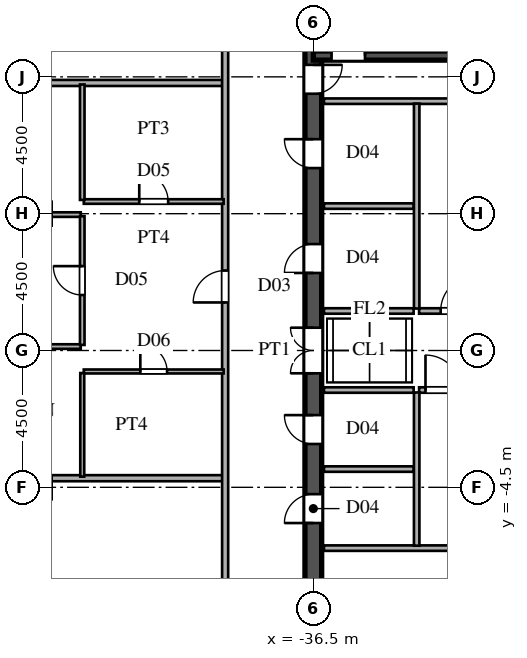
"""IFC4 building model, lengths in metres.
Left out: names, types, materials, properties, quantities, classifications, styles, units other than length and angle.
Written with IfcOpenShell. Run it as: python <this file> out.ifc"""

import sys

from ifc_helpers import new_model, si_unit, direction, frame, frame_2d, origin, place, context, subcontext, project, spatial, rectangle, extrude, source, transform, mapped, element, fill, save


model = new_model("IFC4")
c1 = context("Model", 3, precision=1e-05, world=origin(), true_north=direction((0.0, 1.0)))
c2 = subcontext(c1, "Body", "Model", "MODEL_VIEW")
j1 = project(units=[si_unit("LENGTHUNIT", "METRE"), si_unit("PLANEANGLEUNIT", "RADIAN")], contexts=[c1])
p1 = place(None, origin())
s1 = spatial("IfcSite", under=j1, at=p1, CompositionType="ELEMENT")
p2 = place(p1, origin())
s2 = spatial("IfcBuilding", under=s1, at=p2, CompositionType="ELEMENT")
p3 = place(p2, frame((0.0, 0.0, 151.2)))
s3 = spatial("IfcBuildingStorey", under=s2, at=p3, CompositionType="ELEMENT", Elevation=151.2)
p4 = place(p3, frame((-36.5, -13.65, 0.0), z_axis=(0.0, 0.0, 1.0), x_axis=(0.0, 1.0, 0.0)))
e1 = element("IfcWall", 1, at=p4, inside=s3, PredefinedType="SHEAR", context=c2, shape_type="SweptSolid", body=[
    extrude(rectangle(XDim=7.15, YDim=0.55, at=frame_2d((3.575, 0.0))), origin(), (0.0, 0.0, 1.0), 3.38),
])
p5 = place(p4, frame((4.675, 0.0, 0.0)))
e2 = element("IfcOpeningElement", 2, at=p5, cuts=e1, PredefinedType="OPENING", context=c2, shape_type="SweptSolid", body=[
    extrude(rectangle(XDim=1.15, YDim=2.2, at=frame_2d((0.575, 1.1))), frame((0.0, 0.285, 0.0), z_axis=(0.0, -1.0, 0.0), x_axis=(1.0, 0.0, 0.0)), (0.0, 0.0, 1.0), 0.57),
])
p6 = place(p3, frame((-36.5, -1.3, 0.0), z_axis=(0.0, 0.0, 1.0), x_axis=(0.0, 1.0, 0.0)))
e3 = element("IfcWall", 3, at=p6, inside=s3, PredefinedType="SHEAR", context=c2, shape_type="SweptSolid", body=[
    extrude(rectangle(XDim=2.6, YDim=0.55, at=frame_2d((1.3, 0.0))), origin(), (0.0, 0.0, 1.0), 3.38),
])
p7 = place(p6, frame((0.55, 0.0, 0.0)))
e4 = element("IfcOpeningElement", 4, at=p7, cuts=e3, PredefinedType="OPENING", context=c2, shape_type="SweptSolid", body=[
    extrude(rectangle(XDim=1.5, YDim=2.3, at=frame_2d((0.75, 1.15))), frame((0.0, 0.285, 0.0), z_axis=(0.0, -1.0, 0.0), x_axis=(1.0, 0.0, 0.0)), (0.0, 0.0, 1.0), 0.57),
])
p8 = place(p3, frame((-36.5, 8.2, 0.0), z_axis=(0.0, 0.0, 1.0), x_axis=(0.0, 1.0, 0.0)))
e5 = element("IfcWall", 5, at=p8, inside=s3, PredefinedType="SHEAR", context=c2, shape_type="SweptSolid", body=[
    extrude(rectangle(XDim=5.45, YDim=0.55, at=frame_2d((2.725, 0.0))), origin(), (0.0, 0.0, 1.0), 3.38),
])
p9 = place(p8, frame((0.245, 0.0, 0.0)))
e6 = element("IfcOpeningElement", 6, at=p9, cuts=e5, PredefinedType="OPENING", context=c2, shape_type="SweptSolid", body=[
    extrude(rectangle(XDim=0.95, YDim=2.15, at=frame_2d((0.475, 1.075))), frame((0.0, 0.285, 0.0), z_axis=(0.0, -1.0, 0.0), x_axis=(1.0, 0.0, 0.0)), (0.0, 0.0, 1.0), 0.57),
])
p10 = place(p3, frame((-36.5, -6.5, 0.0), z_axis=(0.0, 0.0, 1.0), x_axis=(0.0, 1.0, 0.0)))
e7 = element("IfcWall", 7, at=p10, inside=s3, PredefinedType="SHEAR", context=c2, shape_type="SweptSolid", body=[
    extrude(rectangle(XDim=2.6, YDim=0.55, at=frame_2d((1.3, 0.0))), origin(), (0.0, 0.0, 1.0), 3.38),
])
p11 = place(p10, frame((0.825, 0.0, 0.0)))
e8 = element("IfcOpeningElement", 8, at=p11, cuts=e7, PredefinedType="OPENING", context=c2, shape_type="SweptSolid", body=[
    extrude(rectangle(XDim=0.95, YDim=2.15, at=frame_2d((0.475, 1.075))), frame((0.0, 0.285, 0.0), z_axis=(0.0, -1.0, 0.0), x_axis=(1.0, 0.0, 0.0)), (0.0, 0.0, 1.0), 0.57),
])
p12 = place(p3, frame((-36.5, -3.9, 0.0), z_axis=(0.0, 0.0, 1.0), x_axis=(0.0, 1.0, 0.0)))
e9 = element("IfcWall", 9, at=p12, inside=s3, PredefinedType="SHEAR", context=c2, shape_type="SweptSolid", body=[
    extrude(rectangle(XDim=2.6, YDim=0.55, at=frame_2d((1.3, 0.0))), origin(), (0.0, 0.0, 1.0), 3.38),
])
p13 = place(p12, frame((0.825, 0.0, 0.0)))
e10 = element("IfcOpeningElement", 10, at=p13, cuts=e9, PredefinedType="OPENING", context=c2, shape_type="SweptSolid", body=[
    extrude(rectangle(XDim=0.95, YDim=2.15, at=frame_2d((0.475, 1.075))), frame((0.0, 0.285, 0.0), z_axis=(0.0, -1.0, 0.0), x_axis=(1.0, 0.0, 0.0)), (0.0, 0.0, 1.0), 0.57),
])
p14 = place(p3, frame((-36.5, 1.3, 0.0), z_axis=(0.0, 0.0, 1.0), x_axis=(0.0, 1.0, 0.0)))
e11 = element("IfcWall", 11, at=p14, inside=s3, PredefinedType="SHEAR", context=c2, shape_type="SweptSolid", body=[
    extrude(rectangle(XDim=3.45, YDim=0.55, at=frame_2d((1.725, 0.0))), origin(), (0.0, 0.0, 1.0), 3.38),
])
p15 = place(p14, frame((1.25, 0.0, 0.0)))
e12 = element("IfcOpeningElement", 12, at=p15, cuts=e11, PredefinedType="OPENING", context=c2, shape_type="SweptSolid", body=[
    extrude(rectangle(XDim=0.95, YDim=2.15, at=frame_2d((0.475, 1.075))), frame((0.0, 0.285, 0.0), z_axis=(0.0, -1.0, 0.0), x_axis=(1.0, 0.0, 0.0)), (0.0, 0.0, 1.0), 0.57),
])
p16 = place(p3, frame((-36.5, 4.75, 0.0), z_axis=(0.0, 0.0, 1.0), x_axis=(0.0, 1.0, 0.0)))
e13 = element("IfcWall", 13, at=p16, inside=s3, PredefinedType="SHEAR", context=c2, shape_type="SweptSolid", body=[
    extrude(rectangle(XDim=3.45, YDim=0.55, at=frame_2d((1.725, 0.0))), origin(), (0.0, 0.0, 1.0), 3.38),
])
p17 = place(p16, frame((1.25, 0.0, 0.0)))
e14 = element("IfcOpeningElement", 14, at=p17, cuts=e13, PredefinedType="OPENING", context=c2, shape_type="SweptSolid", body=[
    extrude(rectangle(XDim=0.95, YDim=2.15, at=frame_2d((0.475, 1.075))), frame((0.0, 0.285, 0.0), z_axis=(0.0, -1.0, 0.0), x_axis=(1.0, 0.0, 0.0)), (0.0, 0.0, 1.0), 0.57),
])
p18 = place(p3, frame((-36.5, 9.7, 0.0), z_axis=(0.0, 0.0, 1.0), x_axis=(1.0, 0.0, 0.0)))
e15 = element("IfcWall", 15, at=p18, inside=s3, PredefinedType="SHEAR", context=c2, shape_type="SweptSolid", body=[
    extrude(rectangle(XDim=9.0, YDim=0.3, at=frame_2d((4.5, 0.0))), origin(), (0.0, 0.0, 1.0), 3.38),
])
p19 = place(p18, frame((0.6, 0.0, 0.0)))
e16 = element("IfcOpeningElement", 16, at=p19, cuts=e15, PredefinedType="OPENING", context=c2, shape_type="SweptSolid", body=[
    extrude(rectangle(XDim=1.1, YDim=2.2, at=frame_2d((0.55, 1.1))), frame((0.0, 0.16, 0.0), z_axis=(0.0, -1.0, 0.0), x_axis=(1.0, 0.0, 0.0)), (0.0, 0.0, 1.0), 0.32),
])
for number, where, z_axis, x_axis in (
    (17, (-36.15, -6.5, 0.0), (0.0, 0.0, 1.0), (1.0, 0.0, 0.0)),
    (18, (-36.15, 8.2, 0.0), (0.0, 0.0, 1.0), (1.0, 0.0, 0.0)),
):
    element("IfcWall", number, at=place(p3, frame(where, z_axis=z_axis, x_axis=x_axis)), inside=s3, PredefinedType="PARTITIONING", context=c2, shape_type="SweptSolid", body=[
        extrude(rectangle(XDim=5.7, YDim=0.18, at=frame_2d((2.85, 0.0))), origin(), (0.0, 0.0, 1.0), 3.38),
    ])
p20 = place(p3, frame((-33.1, -6.42, 0.0), z_axis=(0.0, 0.0, 1.0), x_axis=(0.0, 1.0, 0.0)))
e19 = element("IfcWall", 19, at=p20, inside=s3, PredefinedType="PARTITIONING", context=c2, shape_type="SweptSolid", body=[
    extrude(rectangle(XDim=5.04, YDim=0.18, at=frame_2d((2.52, 0.0))), origin(), (0.0, 0.0, 1.0), 3.38),
])
p21 = place(p3, frame((-33.1, 1.38, 0.0), z_axis=(0.0, 0.0, 1.0), x_axis=(0.0, 1.0, 0.0)))
e20 = element("IfcWall", 20, at=p21, inside=s3, PredefinedType="PARTITIONING", context=c2, shape_type="SweptSolid", body=[
    extrude(rectangle(XDim=6.74, YDim=0.18, at=frame_2d((3.37, 0.0))), origin(), (0.0, 0.0, 1.0), 3.38),
])
p22 = place(p3, frame((-33.02, -1.3, 0.0), z_axis=(0.0, 0.0, 1.0), x_axis=(1.0, 0.0, 0.0)))
e21 = element("IfcWall", 21, at=p22, inside=s3, PredefinedType="PARTITIONING", context=c2, shape_type="SweptSolid", body=[
    extrude(rectangle(XDim=2.72, YDim=0.18, at=frame_2d((1.36, 0.0))), origin(), (0.0, 0.0, 1.0), 3.38),
])
p23 = place(p22, frame((0.21, 0.0, 0.0)))
e22 = element("IfcOpeningElement", 22, at=p23, cuts=e21, PredefinedType="OPENING", context=c2, shape_type="SweptSolid", body=[
    extrude(rectangle(XDim=1.15, YDim=2.2, at=frame_2d((0.575, 1.1))), frame((0.0, 0.1, 0.0), z_axis=(0.0, -1.0, 0.0), x_axis=(1.0, 0.0, 0.0)), (0.0, 0.0, 1.0), 0.2),
])
p24 = place(p3, frame((-33.02, 1.3, 0.0), z_axis=(0.0, 0.0, 1.0), x_axis=(1.0, 0.0, 0.0)))
e23 = element("IfcWall", 23, at=p24, inside=s3, PredefinedType="PARTITIONING", context=c2, shape_type="SweptSolid", body=[
    extrude(rectangle(XDim=2.57, YDim=0.18, at=frame_2d((1.285, 0.0))), origin(), (0.0, 0.0, 1.0), 3.38),
])
p25 = place(p24, frame((0.71, 0.0, 0.0)))
e24 = element("IfcOpeningElement", 24, at=p25, cuts=e23, PredefinedType="OPENING", context=c2, shape_type="SweptSolid", body=[
    extrude(rectangle(XDim=1.15, YDim=2.2, at=frame_2d((0.575, 1.1))), frame((0.0, 0.1, 0.0), z_axis=(0.0, -1.0, 0.0), x_axis=(1.0, 0.0, 0.0)), (0.0, 0.0, 1.0), 0.2),
])
for number, where, z_axis, x_axis in (
    (25, (-36.15, -1.3, 0.0), (0.0, 0.0, 1.0), (1.0, 0.0, 0.0)),
    (26, (-36.15, 1.3, 0.0), (0.0, 0.0, 1.0), (1.0, 0.0, 0.0)),
    (27, (-36.15, -3.9, 0.0), (0.0, 0.0, 1.0), (1.0, 0.0, 0.0)),
    (28, (-36.15, 4.75, 0.0), (0.0, 0.0, 1.0), (1.0, 0.0, 0.0)),
):
    element("IfcWall", number, at=place(p3, frame(where, z_axis=z_axis, x_axis=x_axis)), inside=s3, PredefinedType="PARTITIONING", context=c2, shape_type="SweptSolid", body=[
        extrude(rectangle(XDim=2.95, YDim=0.18, at=frame_2d((1.475, 0.0))), origin(), (0.0, 0.0, 1.0), 3.38),
    ])
p26 = place(p3, frame((-69.375, -4.2, 0.0), z_axis=(0.0, 0.0, 1.0), x_axis=(1.0, 0.0, 0.0)))
e29 = element("IfcWall", 29, at=p26, inside=s3, PredefinedType="PARTITIONING", context=c2, shape_type="SweptSolid", body=[
    extrude(rectangle(XDim=29.895, YDim=0.2, at=frame_2d((14.948, 0.0))), origin(), (0.0, 0.0, 1.0), 3.38),
])
p27 = place(p3, frame((-44.05, -0.69, 0.0), z_axis=(0.0, 0.0, 1.0), x_axis=(1.0, 0.0, 0.0)))
e30 = element("IfcWall", 30, at=p27, inside=s3, PredefinedType="PARTITIONING", context=c2, shape_type="SweptSolid", body=[
    extrude(rectangle(XDim=4.6, YDim=0.13, at=frame_2d((2.3, 0.0))), origin(), (0.0, 0.0, 1.0), 3.38),
])
p28 = place(p27, frame((1.86, 0.0, 0.0)))
e31 = element("IfcOpeningElement", 31, at=p28, cuts=e30, PredefinedType="OPENING", context=c2, shape_type="SweptSolid", body=[
    extrude(rectangle(XDim=0.88, YDim=2.1, at=frame_2d((0.44, 1.05))), frame((0.0, 0.075, 0.0), z_axis=(0.0, -1.0, 0.0), x_axis=(1.0, 0.0, 0.0)), (0.0, 0.0, 1.0), 0.15),
])
p29 = place(p3, frame((-69.535, 0.13, 0.0), z_axis=(0.0, 0.0, 1.0), x_axis=(1.0, 0.0, 0.0)))
e32 = element("IfcWall", 32, at=p29, inside=s3, PredefinedType="PARTITIONING", context=c2, shape_type="SweptSolid", body=[
    extrude(rectangle(XDim=25.385, YDim=0.15, at=frame_2d((12.692, 0.0))), origin(), (0.0, 0.0, 1.0), 3.38),
])
p30 = place(p29, frame((19.76, 0.0, 0.0)))
e33 = element("IfcOpeningElement", 33, at=p30, cuts=e32, PredefinedType="OPENING", context=c2, shape_type="SweptSolid", body=[
    extrude(rectangle(XDim=0.95, YDim=2.15, at=frame_2d((0.475, 1.075))), frame((0.0, 0.085, 0.0), z_axis=(0.0, -1.0, 0.0), x_axis=(1.0, 0.0, 0.0)), (0.0, 0.0, 1.0), 0.17),
])
p31 = place(p29, frame((11.71, 0.0, 0.0)))
e34 = element("IfcOpeningElement", 34, at=p31, cuts=e32, PredefinedType="OPENING", context=c2, shape_type="SweptSolid", body=[
    extrude(rectangle(XDim=0.95, YDim=2.15, at=frame_2d((0.475, 1.075))), frame((0.0, 0.085, 0.0), z_axis=(0.0, -1.0, 0.0), x_axis=(1.0, 0.0, 0.0)), (0.0, 0.0, 1.0), 0.17),
])
p32 = place(p3, frame((-69.375, 4.47, 0.0), z_axis=(0.0, 0.0, 1.0), x_axis=(1.0, 0.0, 0.0)))
e35 = element("IfcWall", 35, at=p32, inside=s3, PredefinedType="PARTITIONING", context=c2, shape_type="SweptSolid", body=[
    extrude(rectangle(XDim=25.225, YDim=0.15, at=frame_2d((12.613, 0.0))), origin(), (0.0, 0.0, 1.0), 2.78),
])
p33 = place(p32, frame((19.6, 0.0, 0.0)))
e36 = element("IfcOpeningElement", 36, at=p33, cuts=e35, PredefinedType="OPENING", context=c2, shape_type="SweptSolid", body=[
    extrude(rectangle(XDim=0.95, YDim=2.15, at=frame_2d((0.475, 1.075))), frame((0.0, 0.085, 0.0), z_axis=(0.0, -1.0, 0.0), x_axis=(1.0, 0.0, 0.0)), (0.0, 0.0, 1.0), 0.17),
])
p34 = place(p32, frame((11.55, 0.0, 0.0)))
e37 = element("IfcOpeningElement", 37, at=p34, cuts=e35, PredefinedType="OPENING", context=c2, shape_type="SweptSolid", body=[
    extrude(rectangle(XDim=0.95, YDim=2.15, at=frame_2d((0.475, 1.075))), frame((0.0, 0.085, 0.0), z_axis=(0.0, -1.0, 0.0), x_axis=(1.0, 0.0, 0.0)), (0.0, 0.0, 1.0), 0.17),
])
p35 = place(p3, frame((-44.05, 4.9, 0.0), z_axis=(0.0, 0.0, 1.0), x_axis=(1.0, 0.0, 0.0)))
e38 = element("IfcWall", 38, at=p35, inside=s3, PredefinedType="PARTITIONING", context=c2, shape_type="SweptSolid", body=[
    extrude(rectangle(XDim=4.6, YDim=0.15, at=frame_2d((2.3, 0.0))), origin(), (0.0, 0.0, 1.0), 3.38),
])
p36 = place(p35, frame((1.825, 0.0, 0.0)))
e39 = element("IfcOpeningElement", 39, at=p36, cuts=e38, PredefinedType="OPENING", context=c2, shape_type="SweptSolid", body=[
    extrude(rectangle(XDim=0.95, YDim=2.15, at=frame_2d((0.475, 1.075))), frame((0.0, 0.085, 0.0), z_axis=(0.0, -1.0, 0.0), x_axis=(1.0, 0.0, 0.0)), (0.0, 0.0, 1.0), 0.17),
])
p37 = place(p3, frame((-62.106, 8.8, 0.0), z_axis=(0.0, 0.0, 1.0), x_axis=(1.0, 0.0, 0.0)))
e40 = element("IfcWall", 40, at=p37, inside=s3, PredefinedType="PARTITIONING", context=c2, shape_type="SweptSolid", body=[
    extrude(rectangle(XDim=22.626, YDim=0.2, at=frame_2d((11.313, 0.0))), origin(), (0.0, 0.0, 1.0), 3.38),
])
p38 = place(p3, frame((-44.1, -4.15, 0.0), z_axis=(0.0, 0.0, 1.0), x_axis=(0.0, 1.0, 0.0)))
e41 = element("IfcWall", 41, at=p38, inside=s3, PredefinedType="PARTITIONING", context=c2, shape_type="SweptSolid", body=[
    extrude(rectangle(XDim=3.408, YDim=0.13, at=frame_2d((1.704, 0.0))), origin(), (0.0, 0.0, 1.0), 3.38),
])
p39 = place(p3, frame((-44.1, 0.183, 0.0), z_axis=(0.0, 0.0, 1.0), x_axis=(0.0, 1.0, 0.0)))
e42 = element("IfcWall", 42, at=p39, inside=s3, PredefinedType="PARTITIONING", context=c2, shape_type="SweptSolid", body=[
    extrude(rectangle(XDim=4.234, YDim=0.15, at=frame_2d((2.117, 0.0))), origin(), (0.0, 0.0, 1.0), 3.38),
])
p40 = place(p39, frame((1.642, 0.0, 0.0)))
e43 = element("IfcOpeningElement", 43, at=p40, cuts=e42, PredefinedType="OPENING", context=c2, shape_type="SweptSolid", body=[
    extrude(rectangle(XDim=0.95, YDim=2.15, at=frame_2d((0.475, 1.075))), frame((0.0, 0.085, 0.0), z_axis=(0.0, -1.0, 0.0), x_axis=(1.0, 0.0, 0.0)), (0.0, 0.0, 1.0), 0.17),
])
p41 = place(p3, frame((-44.1, 4.952, 0.0), z_axis=(0.0, 0.0, 1.0), x_axis=(0.0, 1.0, 0.0)))
e44 = element("IfcWall", 44, at=p41, inside=s3, PredefinedType="PARTITIONING", context=c2, shape_type="SweptSolid", body=[
    extrude(rectangle(XDim=3.798, YDim=0.15, at=frame_2d((1.899, 0.0))), origin(), (0.0, 0.0, 1.0), 3.38),
])
p42 = place(p3, frame((-39.4, -15.715, 0.0), z_axis=(0.0, 0.0, 1.0), x_axis=(0.0, 1.0, 0.0)))
e45 = element("IfcWall", 45, at=p42, inside=s3, PredefinedType="PARTITIONING", context=c2, shape_type="SweptSolid", body=[
    extrude(rectangle(XDim=31.43, YDim=0.2, at=frame_2d((15.715, 0.0))), origin(), (0.0, 0.0, 1.0), 3.38),
])
p43 = place(p42, frame((5.19, 0.0, 0.0)))
e46 = element("IfcOpeningElement", 46, at=p43, cuts=e45, PredefinedType="OPENING", context=c2, shape_type="SweptSolid", body=[
    extrude(rectangle(XDim=1.05, YDim=2.25, at=frame_2d((0.525, 1.125))), frame((0.0, 0.11, 0.0), z_axis=(0.0, -1.0, 0.0), x_axis=(1.0, 0.0, 0.0)), (0.0, 0.0, 1.0), 0.22),
])
p44 = place(p42, frame((17.295, 0.0, 0.0)))
e47 = element("IfcOpeningElement", 47, at=p44, cuts=e45, PredefinedType="OPENING", context=c2, shape_type="SweptSolid", body=[
    extrude(rectangle(XDim=1.05, YDim=2.25, at=frame_2d((0.525, 1.125))), frame((0.0, 0.11, 0.0), z_axis=(0.0, -1.0, 0.0), x_axis=(1.0, 0.0, 0.0)), (0.0, 0.0, 1.0), 0.22),
])
p45 = place(p42, frame((27.49, 0.0, 0.0)))
e48 = element("IfcOpeningElement", 48, at=p45, cuts=e45, PredefinedType="OPENING", context=c2, shape_type="SweptSolid", body=[
    extrude(rectangle(XDim=1.05, YDim=2.25, at=frame_2d((0.525, 1.125))), frame((0.0, 0.11, 0.0), z_axis=(0.0, -1.0, 0.0), x_axis=(1.0, 0.0, 0.0)), (0.0, 0.0, 1.0), 0.22),
])
m1 = source(origin(), c2, "Body", "SweptSolid", [
    extrude(rectangle(XDim=1.5, YDim=2.3, at=frame_2d((0.75, 1.15))), frame((0.0, 0.025, 0.0), z_axis=(0.0, -1.0, 0.0), x_axis=(1.0, 0.0, 0.0)), (0.0, 0.0, 1.0), 0.05),
])
p46 = place(p7, origin())
e49 = element("IfcDoor", 49, at=p46, inside=s3, OperationType="DOUBLE_SWING_LEFT", PredefinedType="DOOR", context=c2, shape_type="MappedRepresentation", body=[
    mapped(m1, transform((0.0, 0.0, 0.0), scale=1.0)),
])
fill(e4, e49)
m2 = source(origin(), c2, "Body", "SweptSolid", [
    extrude(rectangle(XDim=0.95, YDim=2.15, at=frame_2d((0.475, 1.075))), frame((0.0, 0.025, 0.0), z_axis=(0.0, -1.0, 0.0), x_axis=(1.0, 0.0, 0.0)), (0.0, 0.0, 1.0), 0.05),
])
p47 = place(p9, frame((0.95, 0.0, 0.0), z_axis=(0.0, 0.0, 1.0), x_axis=(-1.0, 0.0, 0.0)))
e50 = element("IfcDoor", 50, at=p47, inside=s3, OperationType="SINGLE_SWING_RIGHT", PredefinedType="DOOR", context=c2, shape_type="MappedRepresentation", body=[
    mapped(m2, transform((0.0, 0.0, 0.0), scale=1.0)),
])
fill(e6, e50)
p48 = place(p11, origin())
e51 = element("IfcDoor", 51, at=p48, inside=s3, OperationType="SINGLE_SWING_LEFT", PredefinedType="DOOR", context=c2, shape_type="MappedRepresentation", body=[
    mapped(m2, transform((0.0, 0.0, 0.0), scale=1.0)),
])
fill(e8, e51)
p49 = place(p13, origin())
e52 = element("IfcDoor", 52, at=p49, inside=s3, OperationType="SINGLE_SWING_RIGHT", PredefinedType="DOOR", context=c2, shape_type="MappedRepresentation", body=[
    mapped(m2, transform((0.0, 0.0, 0.0), scale=1.0)),
])
fill(e10, e52)
p50 = place(p15, origin())
e53 = element("IfcDoor", 53, at=p50, inside=s3, OperationType="SINGLE_SWING_LEFT", PredefinedType="DOOR", context=c2, shape_type="MappedRepresentation", body=[
    mapped(m2, transform((0.0, 0.0, 0.0), scale=1.0)),
])
fill(e12, e53)
p51 = place(p17, origin())
e54 = element("IfcDoor", 54, at=p51, inside=s3, OperationType="SINGLE_SWING_RIGHT", PredefinedType="DOOR", context=c2, shape_type="MappedRepresentation", body=[
    mapped(m2, transform((0.0, 0.0, 0.0), scale=1.0)),
])
fill(e14, e54)
m3 = source(origin(), c2, "Body", "SweptSolid", [
    extrude(rectangle(XDim=1.1, YDim=2.2, at=frame_2d((0.55, 1.1))), frame((0.0, 0.025, 0.0), z_axis=(0.0, -1.0, 0.0), x_axis=(1.0, 0.0, 0.0)), (0.0, 0.0, 1.0), 0.05),
])
p52 = place(p19, origin())
e55 = element("IfcDoor", 55, at=p52, inside=s3, OperationType="SINGLE_SWING_RIGHT", PredefinedType="DOOR", context=c2, shape_type="MappedRepresentation", body=[
    mapped(m3, transform((0.0, 0.0, 0.0), scale=1.0)),
])
fill(e16, e55)
m4 = source(origin(), c2, "Body", "SweptSolid", [
    extrude(rectangle(XDim=1.15, YDim=2.2, at=frame_2d((0.575, 1.1))), frame((0.0, 0.025, 0.0), z_axis=(0.0, -1.0, 0.0), x_axis=(1.0, 0.0, 0.0)), (0.0, 0.0, 1.0), 0.05),
])
p53 = place(p23, origin())
e56 = element("IfcDoor", 56, at=p53, inside=s3, OperationType="SINGLE_SWING_LEFT", PredefinedType="DOOR", context=c2, shape_type="MappedRepresentation", body=[
    mapped(m4, transform((0.0, 0.0, 0.0), scale=1.0)),
])
fill(e22, e56)
p54 = place(p25, origin())
e57 = element("IfcDoor", 57, at=p54, inside=s3, OperationType="SINGLE_SWING_RIGHT", PredefinedType="DOOR", context=c2, shape_type="MappedRepresentation", body=[
    mapped(m4, transform((0.0, 0.0, 0.0), scale=1.0)),
])
fill(e24, e57)
m5 = source(origin(), c2, "Body", "SweptSolid", [
    extrude(rectangle(XDim=0.88, YDim=2.1, at=frame_2d((0.44, 1.05))), frame((0.0, 0.025, 0.0), z_axis=(0.0, -1.0, 0.0), x_axis=(1.0, 0.0, 0.0)), (0.0, 0.0, 1.0), 0.05),
])
p55 = place(p28, origin())
e58 = element("IfcDoor", 58, at=p55, inside=s3, OperationType="SINGLE_SWING_LEFT", PredefinedType="DOOR", context=c2, shape_type="MappedRepresentation", body=[
    mapped(m5, transform((0.0, 0.0, 0.0), scale=1.0)),
])
fill(e31, e58)
m6 = source(origin(), c2, "Body", "SweptSolid", [
    extrude(rectangle(XDim=0.95, YDim=2.15, at=frame_2d((0.475, 1.075))), frame((0.0, 0.025, 0.0), z_axis=(0.0, -1.0, 0.0), x_axis=(1.0, 0.0, 0.0)), (0.0, 0.0, 1.0), 0.05),
])
p56 = place(p36, origin())
e59 = element("IfcDoor", 59, at=p56, inside=s3, OperationType="SINGLE_SWING_LEFT", PredefinedType="DOOR", context=c2, shape_type="MappedRepresentation", body=[
    mapped(m6, transform((0.0, 0.0, 0.0), scale=1.0)),
])
fill(e39, e59)
p57 = place(p40, origin())
e60 = element("IfcDoor", 60, at=p57, inside=s3, OperationType="SINGLE_SWING_RIGHT", PredefinedType="DOOR", context=c2, shape_type="MappedRepresentation", body=[
    mapped(m6, transform((0.0, 0.0, 0.0), scale=1.0)),
])
fill(e43, e60)
m7 = source(origin(), c2, "Body", "SweptSolid", [
    extrude(rectangle(XDim=1.05, YDim=2.25, at=frame_2d((0.525, 1.125))), frame((0.0, 0.025, 0.0), z_axis=(0.0, -1.0, 0.0), x_axis=(1.0, 0.0, 0.0)), (0.0, 0.0, 1.0), 0.05),
])
p58 = place(p44, origin())
e61 = element("IfcDoor", 61, at=p58, inside=s3, OperationType="SINGLE_SWING_LEFT", PredefinedType="DOOR", context=c2, shape_type="MappedRepresentation", body=[
    mapped(m7, transform((0.0, 0.0, 0.0), scale=1.0)),
])
fill(e47, e61)
save(model, sys.argv[1])
